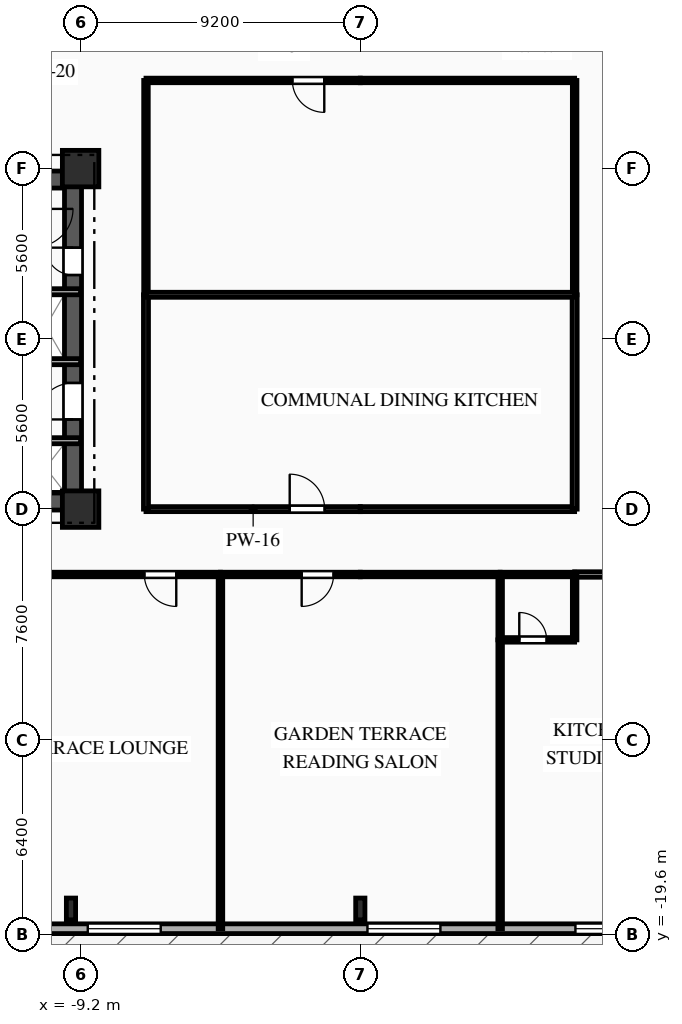
"""IFC4 building model, lengths in metres.
Left out: names, types, materials, properties, quantities, classifications, styles, units other than length and angle.
Written with IfcOpenShell. Run it as: python <this file> out.ifc"""

import sys

from ifc_helpers import new_model, si_unit, direction, frame, frame_2d, origin, origin_2d, place, context, subcontext, project, spatial, rectangle, i_section, extrude, element, fill, save


model = new_model("IFC4")
c1 = context("Model", 3, precision=1e-05, world=origin(), true_north=direction((0.0, 1.0)))
c2 = subcontext(c1, "Body", "Model", "MODEL_VIEW")
j1 = project(units=[si_unit("LENGTHUNIT", "METRE"), si_unit("PLANEANGLEUNIT", "RADIAN")], contexts=[c1])
p1 = place(None, origin())
s1 = spatial("IfcSite", under=j1, at=p1, CompositionType="ELEMENT")
p2 = place(p1, origin())
s2 = spatial("IfcBuilding", under=s1, at=p2, CompositionType="ELEMENT")
p3 = place(p2, frame((0.0, 0.0, 27.0)))
s3 = spatial("IfcBuildingStorey", under=s2, at=p3, CompositionType="ELEMENT", Elevation=27.0)
for number, where, z_axis, x_axis in (
    (1, (-9.2, -5.6, 0.0), (0.0, 0.0, 1.0), (1.0, 0.0, 0.0)),
    (2, (-9.2, 5.6, 0.0), (0.0, 0.0, 1.0), (1.0, 0.0, 0.0)),
):
    element("IfcColumn", number, at=place(p3, frame(where, z_axis=z_axis, x_axis=x_axis)), inside=s3, PredefinedType="COLUMN", context=c2, shape_type="SweptSolid", body=[
        extrude(rectangle(XDim=1.2, YDim=1.2, at=origin_2d()), origin(), (0.0, 0.0, 1.0), 3.35),
    ])
for number, where, z_axis, x_axis in (
    (3, (-9.517, -18.75, 0.0), (0.0, 0.0, 1.0), (1.0, 0.0, 0.0)),
    (4, (0.0, -18.75, 0.0), (0.0, 0.0, 1.0), (1.0, 0.0, 0.0)),
):
    element("IfcColumn", number, at=place(p3, frame(where, z_axis=z_axis, x_axis=x_axis)), inside=s3, PredefinedType="COLUMN", context=c2, shape_type="SweptSolid", body=[
        extrude(i_section(OverallWidth=0.304, OverallDepth=0.716, WebThickness=0.021, FlangeThickness=0.04, FilletRadius=0.027, at=origin_2d()), origin(), (0.0, 0.0, 1.0), 3.35),
    ])
p4 = place(p3, frame((29.2, -19.4, 0.0), z_axis=(0.0, 0.0, 1.0), x_axis=(-1.0, 0.0, 0.0)))
e5 = element("IfcWall", 5, at=p4, inside=s3, PredefinedType="SOLIDWALL", context=c2, shape_type="SweptSolid", body=[
    extrude(rectangle(XDim=58.4, YDim=0.32, at=frame_2d((29.2, 0.0))), origin(), (0.0, 0.0, 1.0), 3.035),
])
p5 = place(p4, frame((6.0, 0.0, 0.0)))
e6 = element("IfcOpeningElement", 6, at=p5, cuts=e5, PredefinedType="OPENING", context=c2, shape_type="SweptSolid", body=[
    extrude(rectangle(XDim=1.5, YDim=2.2, at=frame_2d((0.75, 1.1))), frame((0.0, 0.17, 0.0), z_axis=(0.0, -1.0, 0.0), x_axis=(1.0, 0.0, 0.0)), (0.0, 0.0, 1.0), 0.34),
])
p6 = place(p4, frame((8.198, 0.0, 0.85)))
e7 = element("IfcOpeningElement", 7, at=p6, cuts=e5, PredefinedType="OPENING", context=c2, shape_type="SweptSolid", body=[
    extrude(rectangle(XDim=1.65, YDim=1.85, at=frame_2d((0.825, 0.925))), frame((0.0, 0.17, 0.0), z_axis=(0.0, -1.0, 0.0), x_axis=(1.0, 0.0, 0.0)), (0.0, 0.0, 1.0), 0.34),
])
p7 = place(p4, frame((12.335, 0.0, 0.85)))
e8 = element("IfcOpeningElement", 8, at=p7, cuts=e5, PredefinedType="OPENING", context=c2, shape_type="SweptSolid", body=[
    extrude(rectangle(XDim=1.65, YDim=1.85, at=frame_2d((0.825, 0.925))), frame((0.0, 0.17, 0.0), z_axis=(0.0, -1.0, 0.0), x_axis=(1.0, 0.0, 0.0)), (0.0, 0.0, 1.0), 0.34),
])
p8 = place(p4, frame((19.924, 0.0, 0.85)))
e9 = element("IfcOpeningElement", 9, at=p8, cuts=e5, PredefinedType="OPENING", context=c2, shape_type="SweptSolid", body=[
    extrude(rectangle(XDim=2.2, YDim=1.85, at=frame_2d((1.1, 0.925))), frame((0.0, 0.17, 0.0), z_axis=(0.0, -1.0, 0.0), x_axis=(1.0, 0.0, 0.0)), (0.0, 0.0, 1.0), 0.34),
])
p9 = place(p4, frame((26.565, 0.0, 0.85)))
e10 = element("IfcOpeningElement", 10, at=p9, cuts=e5, PredefinedType="OPENING", context=c2, shape_type="SweptSolid", body=[
    extrude(rectangle(XDim=2.4, YDim=1.95, at=frame_2d((1.2, 0.975))), frame((0.0, 0.17, 0.0), z_axis=(0.0, -1.0, 0.0), x_axis=(1.0, 0.0, 0.0)), (0.0, 0.0, 1.0), 0.34),
])
p10 = place(p4, frame((35.765, 0.0, 0.85)))
e11 = element("IfcOpeningElement", 11, at=p10, cuts=e5, PredefinedType="OPENING", context=c2, shape_type="SweptSolid", body=[
    extrude(rectangle(XDim=2.4, YDim=1.95, at=frame_2d((1.2, 0.975))), frame((0.0, 0.17, 0.0), z_axis=(0.0, -1.0, 0.0), x_axis=(1.0, 0.0, 0.0)), (0.0, 0.0, 1.0), 0.34),
])
p11 = place(p4, frame((44.495, 0.0, 0.85)))
e12 = element("IfcOpeningElement", 12, at=p11, cuts=e5, PredefinedType="OPENING", context=c2, shape_type="SweptSolid", body=[
    extrude(rectangle(XDim=1.65, YDim=1.85, at=frame_2d((0.825, 0.925))), frame((0.0, 0.17, 0.0), z_axis=(0.0, -1.0, 0.0), x_axis=(1.0, 0.0, 0.0)), (0.0, 0.0, 1.0), 0.34),
])
p12 = place(p4, frame((49.095, 0.0, 0.85)))
e13 = element("IfcOpeningElement", 13, at=p12, cuts=e5, PredefinedType="OPENING", context=c2, shape_type="SweptSolid", body=[
    extrude(rectangle(XDim=1.65, YDim=1.85, at=frame_2d((0.825, 0.925))), frame((0.0, 0.17, 0.0), z_axis=(0.0, -1.0, 0.0), x_axis=(1.0, 0.0, 0.0)), (0.0, 0.0, 1.0), 0.34),
])
p13 = place(p4, frame((53.92, 0.0, 0.85)))
e14 = element("IfcOpeningElement", 14, at=p13, cuts=e5, PredefinedType="OPENING", context=c2, shape_type="SweptSolid", body=[
    extrude(rectangle(XDim=2.4, YDim=1.95, at=frame_2d((1.2, 0.975))), frame((0.0, 0.17, 0.0), z_axis=(0.0, -1.0, 0.0), x_axis=(1.0, 0.0, 0.0)), (0.0, 0.0, 1.0), 0.34),
])
p14 = place(p3, frame((-18.8, 5.24, 0.0), z_axis=(0.0, 0.0, 1.0), x_axis=(1.0, 0.0, 0.0)))
e15 = element("IfcWall", 15, at=p14, inside=s3, PredefinedType="SHEAR", context=c2, shape_type="SweptSolid", body=[
    extrude(rectangle(XDim=9.6, YDim=0.56, at=frame_2d((4.8, 0.0))), origin(), (0.0, 0.0, 1.0), 3.035),
])
p15 = place(p14, frame((1.55, 0.0, 0.0)))
e16 = element("IfcOpeningElement", 16, at=p15, cuts=e15, PredefinedType="OPENING", context=c2, shape_type="SweptSolid", body=[
    extrude(rectangle(XDim=1.1, YDim=2.15, at=frame_2d((0.55, 1.075))), frame((0.0, 0.29, 0.0), z_axis=(0.0, -1.0, 0.0), x_axis=(1.0, 0.0, 0.0)), (0.0, 0.0, 1.0), 0.58),
])
p16 = place(p14, frame((4.775, 0.0, 0.0)))
e17 = element("IfcOpeningElement", 17, at=p16, cuts=e15, PredefinedType="OPENING", context=c2, shape_type="SweptSolid", body=[
    extrude(rectangle(XDim=1.05, YDim=2.1, at=frame_2d((0.525, 1.05))), frame((0.0, 0.29, 0.0), z_axis=(0.0, -1.0, 0.0), x_axis=(1.0, 0.0, 0.0)), (0.0, 0.0, 1.0), 0.58),
])
p17 = place(p3, frame((-18.8, -5.35, 0.0), z_axis=(0.0, 0.0, 1.0), x_axis=(1.0, 0.0, 0.0)))
e18 = element("IfcWall", 18, at=p17, inside=s3, PredefinedType="SHEAR", context=c2, shape_type="SweptSolid", body=[
    extrude(rectangle(XDim=9.6, YDim=0.56, at=frame_2d((4.8, 0.0))), origin(), (0.0, 0.0, 1.0), 3.035),
])
p18 = place(p17, frame((1.05, 0.0, 0.0)))
e19 = element("IfcOpeningElement", 19, at=p18, cuts=e18, PredefinedType="OPENING", context=c2, shape_type="SweptSolid", body=[
    extrude(rectangle(XDim=0.9, YDim=2.1, at=frame_2d((0.45, 1.05))), frame((0.0, 0.29, 0.0), z_axis=(0.0, -1.0, 0.0), x_axis=(1.0, 0.0, 0.0)), (0.0, 0.0, 1.0), 0.58),
])
p19 = place(p3, frame((-9.45, -5.05, 0.0), z_axis=(0.0, 0.0, 1.0), x_axis=(0.0, 1.0, 0.0)))
e20 = element("IfcWall", 20, at=p19, inside=s3, PredefinedType="SHEAR", context=c2, shape_type="SweptSolid", body=[
    extrude(rectangle(XDim=10.1, YDim=0.56, at=frame_2d((5.05, 0.0))), origin(), (0.0, 0.0, 1.0), 3.035),
])
p20 = place(p19, frame((7.15, 0.0, 0.0)))
e21 = element("IfcOpeningElement", 21, at=p20, cuts=e20, PredefinedType="OPENING", context=c2, shape_type="SweptSolid", body=[
    extrude(rectangle(XDim=0.9, YDim=2.1, at=frame_2d((0.45, 1.05))), frame((0.0, 0.29, 0.0), z_axis=(0.0, -1.0, 0.0), x_axis=(1.0, 0.0, 0.0)), (0.0, 0.0, 1.0), 0.58),
])
p21 = place(p19, frame((2.4, 0.0, 0.0)))
e22 = element("IfcOpeningElement", 22, at=p21, cuts=e20, PredefinedType="OPENING", context=c2, shape_type="SweptSolid", body=[
    extrude(rectangle(XDim=1.2, YDim=2.15, at=frame_2d((0.6, 1.075))), frame((0.0, 0.29, 0.0), z_axis=(0.0, -1.0, 0.0), x_axis=(1.0, 0.0, 0.0)), (0.0, 0.0, 1.0), 0.58),
])
p22 = place(p3, frame((-11.08, -3.35, 0.0), z_axis=(0.0, 0.0, 1.0), x_axis=(1.0, 0.0, 0.0)))
e23 = element("IfcWall", 23, at=p22, inside=s3, PredefinedType="PARTITIONING", context=c2, shape_type="SweptSolid", body=[
    extrude(rectangle(XDim=1.88, YDim=0.2, at=frame_2d((0.94, 0.0))), origin(), (0.0, 0.0, 1.0), 2.75),
])
p23 = place(p3, frame((-9.2, -0.75, 0.0), z_axis=(0.0, 0.0, 1.0), x_axis=(-1.0, 0.0, 0.0)))
e24 = element("IfcWall", 24, at=p23, inside=s3, PredefinedType="PARTITIONING", context=c2, shape_type="SweptSolid", body=[
    extrude(rectangle(XDim=1.88, YDim=0.2, at=frame_2d((0.94, 0.0))), origin(), (0.0, 0.0, 1.0), 3.035),
])
p24 = place(p3, frame((0.0, 8.5, 0.0), z_axis=(0.0, 0.0, 1.0), x_axis=(-1.0, 0.0, 0.0)))
e25 = element("IfcWall", 25, at=p24, inside=s3, PredefinedType="PARTITIONING", context=c2, shape_type="SweptSolid", body=[
    extrude(rectangle(XDim=7.05, YDim=0.15, at=frame_2d((3.525, 0.0))), origin(), (0.0, 0.0, 1.0), 3.035),
])
p25 = place(p24, frame((1.185, 0.0, 0.0)))
e26 = element("IfcOpeningElement", 26, at=p25, cuts=e25, PredefinedType="OPENING", context=c2, shape_type="SweptSolid", body=[
    extrude(rectangle(XDim=1.05, YDim=2.15, at=frame_2d((0.525, 1.075))), frame((0.0, 0.085, 0.0), z_axis=(0.0, -1.0, 0.0), x_axis=(1.0, 0.0, 0.0)), (0.0, 0.0, 1.0), 0.17),
])
p26 = place(p3, frame((7.05, 8.5, 0.0), z_axis=(0.0, 0.0, 1.0), x_axis=(-1.0, 0.0, 0.0)))
e27 = element("IfcWall", 27, at=p26, inside=s3, PredefinedType="PARTITIONING", context=c2, shape_type="SweptSolid", body=[
    extrude(rectangle(XDim=7.05, YDim=0.15, at=frame_2d((3.525, 0.0))), origin(), (0.0, 0.0, 1.0), 3.035),
])
p27 = place(p3, frame((-4.6, -7.75, 0.0), z_axis=(0.0, 0.0, 1.0), x_axis=(-1.0, 0.0, 0.0)))
e28 = element("IfcWall", 28, at=p27, inside=s3, PredefinedType="PARTITIONING", context=c2, shape_type="SweptSolid", body=[
    extrude(rectangle(XDim=9.2, YDim=0.15, at=frame_2d((4.6, 0.0))), origin(), (0.0, 0.0, 1.0), 3.035),
])
p28 = place(p27, frame((1.454, 0.0, 0.0)))
e29 = element("IfcOpeningElement", 29, at=p28, cuts=e28, PredefinedType="OPENING", context=c2, shape_type="SweptSolid", body=[
    extrude(rectangle(XDim=1.05, YDim=2.15, at=frame_2d((0.525, 1.075))), frame((0.0, 0.085, 0.0), z_axis=(0.0, -1.0, 0.0), x_axis=(1.0, 0.0, 0.0)), (0.0, 0.0, 1.0), 0.17),
])
p29 = place(p3, frame((0.0, -7.75, 0.0), z_axis=(0.0, 0.0, 1.0), x_axis=(-1.0, 0.0, 0.0)))
e30 = element("IfcWall", 30, at=p29, inside=s3, PredefinedType="PARTITIONING", context=c2, shape_type="SweptSolid", body=[
    extrude(rectangle(XDim=4.6, YDim=0.15, at=frame_2d((2.3, 0.0))), origin(), (0.0, 0.0, 1.0), 3.035),
])
p30 = place(p29, frame((0.879, 0.0, 0.0)))
e31 = element("IfcOpeningElement", 31, at=p30, cuts=e30, PredefinedType="OPENING", context=c2, shape_type="SweptSolid", body=[
    extrude(rectangle(XDim=1.05, YDim=2.15, at=frame_2d((0.525, 1.075))), frame((0.0, 0.085, 0.0), z_axis=(0.0, -1.0, 0.0), x_axis=(1.0, 0.0, 0.0)), (0.0, 0.0, 1.0), 0.17),
])
p31 = place(p3, frame((-7.05, -5.6, 0.0), z_axis=(0.0, 0.0, 1.0), x_axis=(1.0, 0.0, 0.0)))
e32 = element("IfcWall", 32, at=p31, inside=s3, PredefinedType="PARTITIONING", context=c2, shape_type="SweptSolid", body=[
    extrude(rectangle(XDim=7.05, YDim=0.165, at=frame_2d((3.525, 0.0))), origin(), (0.0, 0.0, 1.0), 2.52),
])
p32 = place(p31, frame((4.728, 0.0, 0.0)))
e33 = element("IfcOpeningElement", 33, at=p32, cuts=e32, PredefinedType="OPENING", context=c2, shape_type="SweptSolid", body=[
    extrude(rectangle(XDim=1.15, YDim=2.15, at=frame_2d((0.575, 1.075))), frame((0.0, 0.093, 0.0), z_axis=(0.0, -1.0, 0.0), x_axis=(1.0, 0.0, 0.0)), (0.0, 0.0, 1.0), 0.185),
])
p33 = place(p3, frame((4.6, -7.75, 0.0), z_axis=(0.0, 0.0, 1.0), x_axis=(-1.0, 0.0, 0.0)))
e34 = element("IfcWall", 34, at=p33, inside=s3, PredefinedType="PARTITIONING", context=c2, shape_type="SweptSolid", body=[
    extrude(rectangle(XDim=4.6, YDim=0.15, at=frame_2d((2.3, 0.0))), origin(), (0.0, 0.0, 1.0), 3.035),
])
p34 = place(p3, frame((13.8, -7.75, 0.0), z_axis=(0.0, 0.0, 1.0), x_axis=(-1.0, 0.0, 0.0)))
e35 = element("IfcWall", 35, at=p34, inside=s3, PredefinedType="PARTITIONING", context=c2, shape_type="SweptSolid", body=[
    extrude(rectangle(XDim=6.75, YDim=0.18, at=frame_2d((3.375, 0.0))), origin(), (0.0, 0.0, 1.0), 3.035),
])
p35 = place(p34, frame((1.154, 0.0, 0.0)))
e36 = element("IfcOpeningElement", 36, at=p35, cuts=e35, PredefinedType="OPENING", context=c2, shape_type="SweptSolid", body=[
    extrude(rectangle(XDim=1.0, YDim=2.15, at=frame_2d((0.5, 1.075))), frame((0.0, 0.1, 0.0), z_axis=(0.0, -1.0, 0.0), x_axis=(1.0, 0.0, 0.0)), (0.0, 0.0, 1.0), 0.2),
])
p36 = place(p3, frame((7.05, -7.75, 0.0), z_axis=(0.0, 0.0, 1.0), x_axis=(-1.0, 0.0, 0.0)))
e37 = element("IfcWall", 37, at=p36, inside=s3, PredefinedType="PLUMBINGWALL", context=c2, shape_type="SweptSolid", body=[
    extrude(rectangle(XDim=2.45, YDim=0.15, at=frame_2d((1.225, 0.0))), origin(), (0.0, 0.0, 1.0), 3.035),
])
p37 = place(p3, frame((0.0, -5.6, 0.0), z_axis=(0.0, 0.0, 1.0), x_axis=(1.0, 0.0, 0.0)))
e38 = element("IfcWall", 38, at=p37, inside=s3, PredefinedType="PARTITIONING", context=c2, shape_type="SweptSolid", body=[
    extrude(rectangle(XDim=7.05, YDim=0.165, at=frame_2d((3.525, 0.0))), origin(), (0.0, 0.0, 1.0), 2.52),
])
p38 = place(p3, frame((-7.05, 1.45, 0.0), z_axis=(0.0, 0.0, 1.0), x_axis=(0.0, -1.0, 0.0)))
e39 = element("IfcWall", 39, at=p38, inside=s3, PredefinedType="PARTITIONING", context=c2, shape_type="SweptSolid", body=[
    extrude(rectangle(XDim=7.05, YDim=0.165, at=frame_2d((3.525, 0.0))), origin(), (0.0, 0.0, 1.0), 3.035),
])
p39 = place(p3, frame((-7.05, 8.5, 0.0), z_axis=(0.0, 0.0, 1.0), x_axis=(0.0, -1.0, 0.0)))
e40 = element("IfcWall", 40, at=p39, inside=s3, PredefinedType="PARTITIONING", context=c2, shape_type="SweptSolid", body=[
    extrude(rectangle(XDim=7.05, YDim=0.15, at=frame_2d((3.525, 0.0))), origin(), (0.0, 0.0, 1.0), 3.035),
])
p40 = place(p3, frame((7.05, -5.6, 0.0), z_axis=(0.0, 0.0, 1.0), x_axis=(0.0, 1.0, 0.0)))
e41 = element("IfcWall", 41, at=p40, inside=s3, PredefinedType="PARTITIONING", context=c2, shape_type="SweptSolid", body=[
    extrude(rectangle(XDim=7.05, YDim=0.165, at=frame_2d((3.525, 0.0))), origin(), (0.0, 0.0, 1.0), 3.035),
])
p41 = place(p3, frame((7.05, 1.45, 0.0), z_axis=(0.0, 0.0, 1.0), x_axis=(0.0, 1.0, 0.0)))
e42 = element("IfcWall", 42, at=p41, inside=s3, PredefinedType="PARTITIONING", context=c2, shape_type="SweptSolid", body=[
    extrude(rectangle(XDim=7.05, YDim=0.15, at=frame_2d((3.525, 0.0))), origin(), (0.0, 0.0, 1.0), 3.035),
])
p42 = place(p3, frame((-4.6, -7.75, 0.0), z_axis=(0.0, 0.0, 1.0), x_axis=(0.0, -1.0, 0.0)))
e43 = element("IfcWall", 43, at=p42, inside=s3, PredefinedType="PARTITIONING", context=c2, shape_type="SweptSolid", body=[
    extrude(rectangle(XDim=11.65, YDim=0.15, at=frame_2d((5.825, 0.0))), origin(), (0.0, 0.0, 1.0), 3.035),
])
p43 = place(p3, frame((4.6, -9.9, 0.0), z_axis=(0.0, 0.0, 1.0), x_axis=(0.0, -1.0, 0.0)))
e44 = element("IfcWall", 44, at=p43, inside=s3, PredefinedType="PARTITIONING", context=c2, shape_type="SweptSolid", body=[
    extrude(rectangle(XDim=9.5, YDim=0.15, at=frame_2d((4.75, 0.0))), origin(), (0.0, 0.0, 1.0), 3.035),
])
p44 = place(p3, frame((4.6, -7.75, 0.0), z_axis=(0.0, 0.0, 1.0), x_axis=(0.0, -1.0, 0.0)))
e45 = element("IfcWall", 45, at=p44, inside=s3, PredefinedType="PLUMBINGWALL", context=c2, shape_type="SweptSolid", body=[
    extrude(rectangle(XDim=2.15, YDim=0.15, at=frame_2d((1.075, 0.0))), origin(), (0.0, 0.0, 1.0), 3.035),
])
p45 = place(p3, frame((4.6, -9.9, 0.0), z_axis=(0.0, 0.0, 1.0), x_axis=(1.0, 0.0, 0.0)))
e46 = element("IfcWall", 46, at=p45, inside=s3, PredefinedType="PLUMBINGWALL", context=c2, shape_type="SweptSolid", body=[
    extrude(rectangle(XDim=2.45, YDim=0.15, at=frame_2d((1.225, 0.0))), origin(), (0.0, 0.0, 1.0), 3.035),
])
p46 = place(p45, frame((0.629, 0.0, 0.0)))
e47 = element("IfcOpeningElement", 47, at=p46, cuts=e46, PredefinedType="OPENING", context=c2, shape_type="SweptSolid", body=[
    extrude(rectangle(XDim=0.9, YDim=2.1, at=frame_2d((0.45, 1.05))), frame((0.0, 0.085, 0.0), z_axis=(0.0, -1.0, 0.0), x_axis=(1.0, 0.0, 0.0)), (0.0, 0.0, 1.0), 0.17),
])
p47 = place(p3, frame((7.05, -9.9, 0.0), z_axis=(0.0, 0.0, 1.0), x_axis=(0.0, 1.0, 0.0)))
e48 = element("IfcWall", 48, at=p47, inside=s3, PredefinedType="PLUMBINGWALL", context=c2, shape_type="SweptSolid", body=[
    extrude(rectangle(XDim=2.15, YDim=0.15, at=frame_2d((1.075, 0.0))), origin(), (0.0, 0.0, 1.0), 3.035),
])
p48 = place(p3, frame((-7.05, 1.45, 0.0), z_axis=(0.0, 0.0, 1.0), x_axis=(1.0, 0.0, 0.0)))
e49 = element("IfcWall", 49, at=p48, inside=s3, PredefinedType="PARTITIONING", context=c2, shape_type="SweptSolid", body=[
    extrude(rectangle(XDim=14.1, YDim=0.165, at=frame_2d((7.05, 0.0))), origin(), (0.0, 0.0, 1.0), 3.035),
])
p49 = place(p3, frame((-15.05, 1.55, 0.0), z_axis=(0.0, 0.0, 1.0), x_axis=(1.0, 0.0, 0.0)))
e50 = element("IfcWall", 50, at=p49, inside=s3, PredefinedType="PARTITIONING", context=c2, shape_type="SweptSolid", body=[
    extrude(rectangle(XDim=5.85, YDim=0.2, at=frame_2d((2.925, 0.0))), origin(), (0.0, 0.0, 1.0), 3.035),
])
p50 = place(p8, origin())
e51 = element("IfcWindow", 51, at=p50, inside=s3, PartitioningType="SINGLE_PANEL", PredefinedType="WINDOW", context=c2, shape_type="SweptSolid", body=[
    extrude(rectangle(XDim=2.2, YDim=1.85, at=frame_2d((1.1, 0.925))), frame((0.0, 0.03, 0.0), z_axis=(0.0, -1.0, 0.0), x_axis=(1.0, 0.0, 0.0)), (0.0, 0.0, 1.0), 0.06),
])
fill(e9, e51)
p51 = place(p9, origin())
e52 = element("IfcWindow", 52, at=p51, inside=s3, PartitioningType="SINGLE_PANEL", PredefinedType="WINDOW", context=c2, shape_type="SweptSolid", body=[
    extrude(rectangle(XDim=2.4, YDim=1.95, at=frame_2d((1.2, 0.975))), frame((0.0, 0.03, 0.0), z_axis=(0.0, -1.0, 0.0), x_axis=(1.0, 0.0, 0.0)), (0.0, 0.0, 1.0), 0.06),
])
fill(e10, e52)
p52 = place(p10, origin())
e53 = element("IfcWindow", 53, at=p52, inside=s3, PartitioningType="SINGLE_PANEL", PredefinedType="WINDOW", context=c2, shape_type="SweptSolid", body=[
    extrude(rectangle(XDim=2.4, YDim=1.95, at=frame_2d((1.2, 0.975))), frame((0.0, 0.03, 0.0), z_axis=(0.0, -1.0, 0.0), x_axis=(1.0, 0.0, 0.0)), (0.0, 0.0, 1.0), 0.06),
])
fill(e11, e53)
p53 = place(p20, origin())
e54 = element("IfcDoor", 54, at=p53, inside=s3, OperationType="SINGLE_SWING_RIGHT", PredefinedType="DOOR", context=c2, shape_type="SweptSolid", body=[
    extrude(rectangle(XDim=0.9, YDim=2.1, at=frame_2d((0.45, 1.05))), frame((0.0, 0.025, 0.0), z_axis=(0.0, -1.0, 0.0), x_axis=(1.0, 0.0, 0.0)), (0.0, 0.0, 1.0), 0.05),
])
fill(e21, e54)
p54 = place(p21, origin())
e55 = element("IfcDoor", 55, at=p54, inside=s3, OperationType="SINGLE_SWING_LEFT", PredefinedType="DOOR", context=c2, shape_type="SweptSolid", body=[
    extrude(rectangle(XDim=1.2, YDim=2.15, at=frame_2d((0.6, 1.075))), frame((0.0, 0.025, 0.0), z_axis=(0.0, -1.0, 0.0), x_axis=(1.0, 0.0, 0.0)), (0.0, 0.0, 1.0), 0.05),
])
fill(e22, e55)
p55 = place(p25, origin())
e56 = element("IfcDoor", 56, at=p55, inside=s3, OperationType="SINGLE_SWING_LEFT", PredefinedType="DOOR", context=c2, shape_type="SweptSolid", body=[
    extrude(rectangle(XDim=1.05, YDim=2.15, at=frame_2d((0.525, 1.075))), frame((0.0, 0.025, 0.0), z_axis=(0.0, -1.0, 0.0), x_axis=(1.0, 0.0, 0.0)), (0.0, 0.0, 1.0), 0.05),
])
fill(e26, e56)
p56 = place(p28, origin())
e57 = element("IfcDoor", 57, at=p56, inside=s3, OperationType="SINGLE_SWING_LEFT", PredefinedType="DOOR", context=c2, shape_type="SweptSolid", body=[
    extrude(rectangle(XDim=1.05, YDim=2.15, at=frame_2d((0.525, 1.075))), frame((0.0, 0.025, 0.0), z_axis=(0.0, -1.0, 0.0), x_axis=(1.0, 0.0, 0.0)), (0.0, 0.0, 1.0), 0.05),
])
fill(e29, e57)
p57 = place(p30, origin())
e58 = element("IfcDoor", 58, at=p57, inside=s3, OperationType="SINGLE_SWING_RIGHT", PredefinedType="DOOR", context=c2, shape_type="SweptSolid", body=[
    extrude(rectangle(XDim=1.05, YDim=2.15, at=frame_2d((0.525, 1.075))), frame((0.0, 0.025, 0.0), z_axis=(0.0, -1.0, 0.0), x_axis=(1.0, 0.0, 0.0)), (0.0, 0.0, 1.0), 0.05),
])
fill(e31, e58)
p58 = place(p32, origin())
e59 = element("IfcDoor", 59, at=p58, inside=s3, OperationType="SINGLE_SWING_LEFT", PredefinedType="DOOR", context=c2, shape_type="SweptSolid", body=[
    extrude(rectangle(XDim=1.15, YDim=2.15, at=frame_2d((0.575, 1.075))), frame((0.0, 0.025, 0.0), z_axis=(0.0, -1.0, 0.0), x_axis=(1.0, 0.0, 0.0)), (0.0, 0.0, 1.0), 0.05),
])
fill(e33, e59)
p59 = place(p46, origin())
e60 = element("IfcDoor", 60, at=p59, inside=s3, OperationType="SINGLE_SWING_LEFT", PredefinedType="DOOR", context=c2, shape_type="SweptSolid", body=[
    extrude(rectangle(XDim=0.9, YDim=2.1, at=frame_2d((0.45, 1.05))), frame((0.0, 0.025, 0.0), z_axis=(0.0, -1.0, 0.0), x_axis=(1.0, 0.0, 0.0)), (0.0, 0.0, 1.0), 0.05),
])
fill(e47, e60)
save(model, sys.argv[1])
